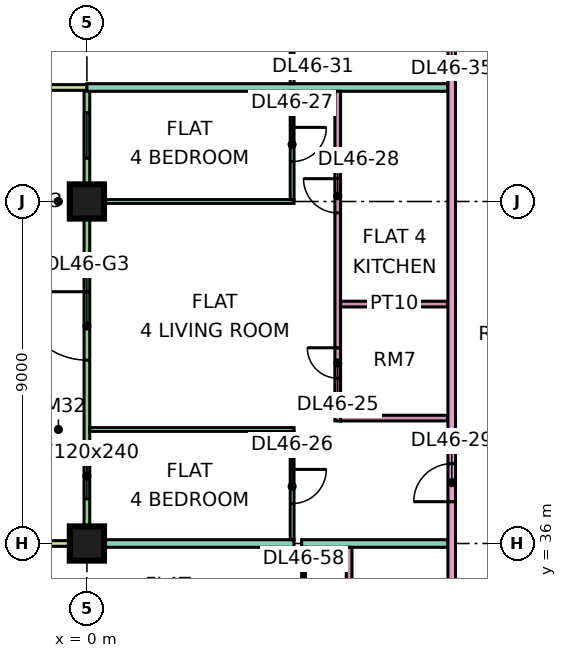
"""IFC4 building model, lengths in metres.
Left out: names, types, materials, properties, quantities, classifications, styles, units other than length and angle.
Written with IfcOpenShell. Run it as: python <this file> out.ifc"""

import sys

from ifc_helpers import new_model, si_unit, direction, frame, frame_2d, origin, origin_2d, place, context, subcontext, project, spatial, rectangle, extrude, element, fill, save


model = new_model("IFC4")
c1 = context("Model", 3, precision=1e-05, world=origin(), true_north=direction((0.0, 1.0)))
c2 = subcontext(c1, "Body", "Model", "MODEL_VIEW")
j1 = project(units=[si_unit("LENGTHUNIT", "METRE"), si_unit("PLANEANGLEUNIT", "RADIAN")], contexts=[c1])
p1 = place(None, origin())
s1 = spatial("IfcSite", under=j1, at=p1, CompositionType="ELEMENT")
p2 = place(p1, origin())
s2 = spatial("IfcBuilding", under=s1, at=p2, CompositionType="ELEMENT")
p3 = place(p2, frame((0.0, 0.0, 198.65)))
s3 = spatial("IfcBuildingStorey", under=s2, at=p3, CompositionType="ELEMENT", Elevation=198.65)
p4 = place(p3, frame((0.0, 36.0, 0.0), z_axis=(0.0, 0.0, 1.0), x_axis=(1.0, 0.0, 0.0)))
e1 = element("IfcColumn", 1, at=p4, inside=s3, PredefinedType="COLUMN", context=c2, shape_type="SweptSolid", body=[
    extrude(rectangle(XDim=0.9, YDim=0.9, at=origin_2d()), origin(), (0.0, 0.0, 1.0), 3.75),
])
p5 = place(p3, frame((0.0, 45.0, 0.0), z_axis=(0.0, 0.0, 1.0), x_axis=(1.0, 0.0, 0.0)))
e2 = element("IfcColumn", 2, at=p5, inside=s3, PredefinedType="COLUMN", context=c2, shape_type="SweptSolid", body=[
    extrude(rectangle(XDim=0.9, YDim=0.9, at=origin_2d()), origin(), (0.0, 0.0, 1.0), 3.75),
])
p6 = place(p3, frame((0.0, 47.925, 0.0), z_axis=(0.0, 0.0, 1.0), x_axis=(0.0, -1.0, 0.0)))
e3 = element("IfcWall", 3, at=p6, inside=s3, PredefinedType="SOLIDWALL", context=c2, shape_type="SweptSolid", body=[
    extrude(rectangle(XDim=11.85, YDim=0.15, at=frame_2d((5.925, 0.0))), origin(), (0.0, 0.0, 1.0), 3.35),
])
p7 = place(p6, frame((0.587, 0.0, 0.45)))
e4 = element("IfcOpeningElement", 4, at=p7, cuts=e3, PredefinedType="OPENING", context=c2, shape_type="SweptSolid", body=[
    extrude(rectangle(XDim=1.2, YDim=2.4, at=frame_2d((0.6, 1.2))), frame((0.0, 0.085, 0.0), z_axis=(0.0, -1.0, 0.0), x_axis=(1.0, 0.0, 0.0)), (0.0, 0.0, 1.0), 0.17),
])
p8 = place(p6, frame((5.3, 0.0, 0.0)))
e5 = element("IfcOpeningElement", 5, at=p8, cuts=e3, PredefinedType="OPENING", context=c2, shape_type="SweptSolid", body=[
    extrude(rectangle(XDim=1.8, YDim=2.4, at=frame_2d((0.9, 1.2))), frame((0.0, 0.085, 0.0), z_axis=(0.0, -1.0, 0.0), x_axis=(1.0, 0.0, 0.0)), (0.0, 0.0, 1.0), 0.17),
])
p9 = place(p6, frame((9.55, 0.0, 0.45)))
e6 = element("IfcOpeningElement", 6, at=p9, cuts=e3, PredefinedType="OPENING", context=c2, shape_type="SweptSolid", body=[
    extrude(rectangle(XDim=1.2, YDim=2.4, at=frame_2d((0.6, 1.2))), frame((0.0, 0.085, 0.0), z_axis=(0.0, -1.0, 0.0), x_axis=(1.0, 0.0, 0.0)), (0.0, 0.0, 1.0), 0.17),
])
for number, where, z_axis, x_axis in (
    (7, (-1.5, 48.0, 0.0), (0.0, 0.0, 1.0), (1.0, 0.0, 0.0)),
    (8, (-1.5, 36.0, 0.0), (0.0, 0.0, 1.0), (1.0, 0.0, 0.0)),
):
    element("IfcWall", number, at=place(p3, frame(where, z_axis=z_axis, x_axis=x_axis)), inside=s3, PredefinedType="SOLIDWALL", context=c2, shape_type="SweptSolid", body=[
        extrude(rectangle(XDim=1.5, YDim=0.15, at=frame_2d((0.75, 0.0))), origin(), (0.0, 0.0, 1.0), 3.35),
    ])
e9 = element("IfcWall", 9, at=p4, inside=s3, PredefinedType="PARTITIONING", context=c2, shape_type="SweptSolid", body=[
    extrude(rectangle(XDim=5.45, YDim=0.2, at=frame_2d((2.725, 0.0))), origin(), (0.0, 0.0, 1.0), 3.35),
])
p10 = place(p3, frame((0.0, 48.0, 0.0), z_axis=(0.0, 0.0, 1.0), x_axis=(1.0, 0.0, 0.0)))
e10 = element("IfcWall", 10, at=p10, inside=s3, PredefinedType="PARTITIONING", context=c2, shape_type="SweptSolid", body=[
    extrude(rectangle(XDim=9.5, YDim=0.2, at=frame_2d((4.75, 0.0))), origin(), (0.0, 0.0, 1.0), 3.35),
])
for number, where, z_axis, x_axis in (
    (11, (0.074, 39.0, 0.0), (0.0, 0.0, 1.0), (1.0, 0.0, 0.0)),
    (12, (0.074, 45.0, 0.0), (0.0, 0.0, 1.0), (1.0, 0.0, 0.0)),
):
    element("IfcWall", number, at=place(p3, frame(where, z_axis=z_axis, x_axis=x_axis)), inside=s3, PredefinedType="PARTITIONING", context=c2, shape_type="SweptSolid", body=[
        extrude(rectangle(XDim=5.376, YDim=0.1, at=frame_2d((2.688, 0.0))), origin(), (0.0, 0.0, 1.0), 3.35),
    ])
p11 = place(p3, frame((5.4, 36.1, 0.0), z_axis=(0.0, 0.0, 1.0), x_axis=(0.0, 1.0, 0.0)))
e13 = element("IfcWall", 13, at=p11, inside=s3, PredefinedType="PARTITIONING", context=c2, shape_type="SweptSolid", body=[
    extrude(rectangle(XDim=2.85, YDim=0.1, at=frame_2d((1.425, 0.0))), origin(), (0.0, 0.0, 1.0), 3.35),
])
p12 = place(p11, frame((0.95, 0.0, 0.0)))
e14 = element("IfcOpeningElement", 14, at=p12, cuts=e13, PredefinedType="OPENING", context=c2, shape_type="SweptSolid", body=[
    extrude(rectangle(XDim=0.9, YDim=2.1, at=frame_2d((0.45, 1.05))), frame((0.0, 0.06, 0.0), z_axis=(0.0, -1.0, 0.0), x_axis=(1.0, 0.0, 0.0)), (0.0, 0.0, 1.0), 0.12),
])
p13 = place(p3, frame((5.4, 45.05, 0.0), z_axis=(0.0, 0.0, 1.0), x_axis=(0.0, 1.0, 0.0)))
e15 = element("IfcWall", 15, at=p13, inside=s3, PredefinedType="PARTITIONING", context=c2, shape_type="SweptSolid", body=[
    extrude(rectangle(XDim=2.85, YDim=0.1, at=frame_2d((1.425, 0.0))), origin(), (0.0, 0.0, 1.0), 3.35),
])
p14 = place(p13, frame((1.0, 0.0, 0.0)))
e16 = element("IfcOpeningElement", 16, at=p14, cuts=e15, PredefinedType="OPENING", context=c2, shape_type="SweptSolid", body=[
    extrude(rectangle(XDim=0.9, YDim=2.1, at=frame_2d((0.45, 1.05))), frame((0.0, 0.06, 0.0), z_axis=(0.0, -1.0, 0.0), x_axis=(1.0, 0.0, 0.0)), (0.0, 0.0, 1.0), 0.12),
])
p15 = place(p3, frame((5.4, 48.1, 0.0), z_axis=(0.0, 0.0, 1.0), x_axis=(0.0, 1.0, 0.0)))
e17 = element("IfcWall", 17, at=p15, inside=s3, PredefinedType="PARTITIONING", context=c2, shape_type="SweptSolid", body=[
    extrude(rectangle(XDim=2.85, YDim=0.1, at=frame_2d((1.425, 0.0))), origin(), (0.0, 0.0, 1.0), 3.35),
])
p16 = place(p15, frame((0.95, 0.0, 0.0)))
e18 = element("IfcOpeningElement", 18, at=p16, cuts=e17, PredefinedType="OPENING", context=c2, shape_type="SweptSolid", body=[
    extrude(rectangle(XDim=0.9, YDim=2.1, at=frame_2d((0.45, 1.05))), frame((0.0, 0.06, 0.0), z_axis=(0.0, -1.0, 0.0), x_axis=(1.0, 0.0, 0.0)), (0.0, 0.0, 1.0), 0.12),
])
p17 = place(p3, frame((5.65, 36.0, 0.0), z_axis=(0.0, 0.0, 1.0), x_axis=(1.0, 0.0, 0.0)))
e19 = element("IfcWall", 19, at=p17, inside=s3, PredefinedType="PARTITIONING", context=c2, shape_type="SweptSolid", body=[
    extrude(rectangle(XDim=3.85, YDim=0.2, at=frame_2d((1.925, 0.0))), origin(), (0.0, 0.0, 1.0), 3.35),
])
p18 = place(p3, frame((5.7, 33.05, 0.0), z_axis=(0.0, 0.0, 1.0), x_axis=(0.0, 1.0, 0.0)))
e20 = element("IfcWall", 20, at=p18, inside=s3, PredefinedType="PARTITIONING", context=c2, shape_type="SweptSolid", body=[
    extrude(rectangle(XDim=2.85, YDim=0.1, at=frame_2d((1.425, 0.0))), origin(), (0.0, 0.0, 1.0), 3.35),
])
p19 = place(p18, frame((1.0, 0.0, 0.0)))
e21 = element("IfcOpeningElement", 21, at=p19, cuts=e20, PredefinedType="OPENING", context=c2, shape_type="SweptSolid", body=[
    extrude(rectangle(XDim=0.9, YDim=2.1, at=frame_2d((0.45, 1.05))), frame((0.0, 0.06, 0.0), z_axis=(0.0, -1.0, 0.0), x_axis=(1.0, 0.0, 0.0)), (0.0, 0.0, 1.0), 0.12),
])
p20 = place(p3, frame((6.6, 39.225, 0.0), z_axis=(0.0, 0.0, 1.0), x_axis=(0.0, 1.0, 0.0)))
e22 = element("IfcWall", 22, at=p20, inside=s3, PredefinedType="PARTITIONING", context=c2, shape_type="SweptSolid", body=[
    extrude(rectangle(XDim=8.675, YDim=0.15, at=frame_2d((4.337, 0.0))), origin(), (0.0, 0.0, 1.0), 3.35),
])
p21 = place(p20, frame((1.125, 0.0, 0.0)))
e23 = element("IfcOpeningElement", 23, at=p21, cuts=e22, PredefinedType="OPENING", context=c2, shape_type="SweptSolid", body=[
    extrude(rectangle(XDim=0.8, YDim=2.1, at=frame_2d((0.4, 1.05))), frame((0.0, 0.085, 0.0), z_axis=(0.0, -1.0, 0.0), x_axis=(1.0, 0.0, 0.0)), (0.0, 0.0, 1.0), 0.17),
])
p22 = place(p20, frame((5.475, 0.0, 0.0)))
e24 = element("IfcOpeningElement", 24, at=p22, cuts=e22, PredefinedType="OPENING", context=c2, shape_type="SweptSolid", body=[
    extrude(rectangle(XDim=0.9, YDim=2.1, at=frame_2d((0.45, 1.05))), frame((0.0, 0.085, 0.0), z_axis=(0.0, -1.0, 0.0), x_axis=(1.0, 0.0, 0.0)), (0.0, 0.0, 1.0), 0.17),
])
for number, where, z_axis, x_axis in (
    (25, (6.675, 39.3, 0.0), (0.0, 0.0, 1.0), (1.0, 0.0, 0.0)),
    (26, (6.675, 42.3, 0.0), (0.0, 0.0, 1.0), (1.0, 0.0, 0.0)),
):
    element("IfcWall", number, at=place(p3, frame(where, z_axis=z_axis, x_axis=x_axis)), inside=s3, PredefinedType="PARTITIONING", context=c2, shape_type="SweptSolid", body=[
        extrude(rectangle(XDim=2.825, YDim=0.15, at=frame_2d((1.413, 0.0))), origin(), (0.0, 0.0, 1.0), 3.35),
    ])
p23 = place(p3, frame((6.9, 27.225, 0.0), z_axis=(0.0, 0.0, 1.0), x_axis=(0.0, 1.0, 0.0)))
e27 = element("IfcWall", 27, at=p23, inside=s3, PredefinedType="PARTITIONING", context=c2, shape_type="SweptSolid", body=[
    extrude(rectangle(XDim=8.675, YDim=0.15, at=frame_2d((4.337, 0.0))), origin(), (0.0, 0.0, 1.0), 3.35),
])
p24 = place(p23, frame((1.125, 0.0, 0.0)))
e28 = element("IfcOpeningElement", 28, at=p24, cuts=e27, PredefinedType="OPENING", context=c2, shape_type="SweptSolid", body=[
    extrude(rectangle(XDim=0.8, YDim=2.1, at=frame_2d((0.4, 1.05))), frame((0.0, 0.085, 0.0), z_axis=(0.0, -1.0, 0.0), x_axis=(1.0, 0.0, 0.0)), (0.0, 0.0, 1.0), 0.17),
])
p25 = place(p23, frame((5.475, 0.0, 0.0)))
e29 = element("IfcOpeningElement", 29, at=p25, cuts=e27, PredefinedType="OPENING", context=c2, shape_type="SweptSolid", body=[
    extrude(rectangle(XDim=0.9, YDim=2.1, at=frame_2d((0.45, 1.05))), frame((0.0, 0.085, 0.0), z_axis=(0.0, -1.0, 0.0), x_axis=(1.0, 0.0, 0.0)), (0.0, 0.0, 1.0), 0.17),
])
p26 = place(p3, frame((9.6, 20.0, 0.0), z_axis=(0.0, 0.0, 1.0), x_axis=(0.0, 1.0, 0.0)))
e30 = element("IfcWall", 30, at=p26, inside=s3, PredefinedType="PARTITIONING", context=c2, shape_type="SweptSolid", body=[
    extrude(rectangle(XDim=44.35, YDim=0.2, at=frame_2d((22.175, 0.0))), origin(), (0.0, 0.0, 1.0), 3.35),
])
p27 = place(p26, frame((17.1, 0.0, 0.0)))
e31 = element("IfcOpeningElement", 31, at=p27, cuts=e30, PredefinedType="OPENING", context=c2, shape_type="SweptSolid", body=[
    extrude(rectangle(XDim=1.0, YDim=2.1, at=frame_2d((0.5, 1.05))), frame((0.0, 0.11, 0.0), z_axis=(0.0, -1.0, 0.0), x_axis=(1.0, 0.0, 0.0)), (0.0, 0.0, 1.0), 0.22),
])
p28 = place(p26, frame((29.1, 0.0, 0.0)))
e32 = element("IfcOpeningElement", 32, at=p28, cuts=e30, PredefinedType="OPENING", context=c2, shape_type="SweptSolid", body=[
    extrude(rectangle(XDim=1.0, YDim=2.1, at=frame_2d((0.5, 1.05))), frame((0.0, 0.11, 0.0), z_axis=(0.0, -1.0, 0.0), x_axis=(1.0, 0.0, 0.0)), (0.0, 0.0, 1.0), 0.22),
])
p29 = place(p26, frame((0.6, 0.0, 0.0)))
e33 = element("IfcOpeningElement", 33, at=p29, cuts=e30, PredefinedType="OPENING", context=c2, shape_type="SweptSolid", body=[
    extrude(rectangle(XDim=1.2, YDim=2.1, at=frame_2d((0.6, 1.05))), frame((0.0, 0.11, 0.0), z_axis=(0.0, -1.0, 0.0), x_axis=(1.0, 0.0, 0.0)), (0.0, 0.0, 1.0), 0.22),
])
p30 = place(p26, frame((4.35, 0.0, 0.0)))
e34 = element("IfcOpeningElement", 34, at=p30, cuts=e30, PredefinedType="OPENING", context=c2, shape_type="SweptSolid", body=[
    extrude(rectangle(XDim=1.0, YDim=2.1, at=frame_2d((0.5, 1.05))), frame((0.0, 0.11, 0.0), z_axis=(0.0, -1.0, 0.0), x_axis=(1.0, 0.0, 0.0)), (0.0, 0.0, 1.0), 0.22),
])
p31 = place(p7, origin())
e35 = element("IfcWindow", 35, at=p31, inside=s3, PartitioningType="SINGLE_PANEL", PredefinedType="WINDOW", context=c2, shape_type="SweptSolid", body=[
    extrude(rectangle(XDim=1.2, YDim=2.4, at=frame_2d((0.6, 1.2))), frame((0.0, 0.03, 0.0), z_axis=(0.0, -1.0, 0.0), x_axis=(1.0, 0.0, 0.0)), (0.0, 0.0, 1.0), 0.06),
])
fill(e4, e35)
p32 = place(p8, frame((1.8, 0.0, 0.0), z_axis=(0.0, 0.0, 1.0), x_axis=(-1.0, 0.0, 0.0)))
e36 = element("IfcDoor", 36, at=p32, inside=s3, OperationType="DOUBLE_DOOR_SINGLE_SWING", PredefinedType="DOOR", context=c2, shape_type="SweptSolid", body=[
    extrude(rectangle(XDim=1.8, YDim=2.4, at=frame_2d((0.9, 1.2))), frame((0.0, 0.025, 0.0), z_axis=(0.0, -1.0, 0.0), x_axis=(1.0, 0.0, 0.0)), (0.0, 0.0, 1.0), 0.05),
])
fill(e5, e36)
p33 = place(p9, origin())
e37 = element("IfcWindow", 37, at=p33, inside=s3, PartitioningType="SINGLE_PANEL", PredefinedType="WINDOW", context=c2, shape_type="SweptSolid", body=[
    extrude(rectangle(XDim=1.2, YDim=2.4, at=frame_2d((0.6, 1.2))), frame((0.0, 0.03, 0.0), z_axis=(0.0, -1.0, 0.0), x_axis=(1.0, 0.0, 0.0)), (0.0, 0.0, 1.0), 0.06),
])
fill(e6, e37)
p34 = place(p21, frame((0.8, 0.0, 0.0), z_axis=(0.0, 0.0, 1.0), x_axis=(-1.0, 0.0, 0.0)))
e38 = element("IfcDoor", 38, at=p34, inside=s3, OperationType="SINGLE_SWING_RIGHT", PredefinedType="DOOR", context=c2, shape_type="SweptSolid", body=[
    extrude(rectangle(XDim=0.8, YDim=2.1, at=frame_2d((0.4, 1.05))), frame((0.0, 0.025, 0.0), z_axis=(0.0, -1.0, 0.0), x_axis=(1.0, 0.0, 0.0)), (0.0, 0.0, 1.0), 0.05),
])
fill(e23, e38)
p35 = place(p12, origin())
e39 = element("IfcDoor", 39, at=p35, inside=s3, OperationType="SINGLE_SWING_RIGHT", PredefinedType="DOOR", context=c2, shape_type="SweptSolid", body=[
    extrude(rectangle(XDim=0.9, YDim=2.1, at=frame_2d((0.45, 1.05))), frame((0.0, 0.025, 0.0), z_axis=(0.0, -1.0, 0.0), x_axis=(1.0, 0.0, 0.0)), (0.0, 0.0, 1.0), 0.05),
])
fill(e14, e39)
p36 = place(p14, origin())
e40 = element("IfcDoor", 40, at=p36, inside=s3, OperationType="SINGLE_SWING_RIGHT", PredefinedType="DOOR", context=c2, shape_type="SweptSolid", body=[
    extrude(rectangle(XDim=0.9, YDim=2.1, at=frame_2d((0.45, 1.05))), frame((0.0, 0.025, 0.0), z_axis=(0.0, -1.0, 0.0), x_axis=(1.0, 0.0, 0.0)), (0.0, 0.0, 1.0), 0.05),
])
fill(e16, e40)
p37 = place(p22, frame((0.9, 0.0, 0.0), z_axis=(0.0, 0.0, 1.0), x_axis=(-1.0, 0.0, 0.0)))
e41 = element("IfcDoor", 41, at=p37, inside=s3, OperationType="SINGLE_SWING_RIGHT", PredefinedType="DOOR", context=c2, shape_type="SweptSolid", body=[
    extrude(rectangle(XDim=0.9, YDim=2.1, at=frame_2d((0.45, 1.05))), frame((0.0, 0.025, 0.0), z_axis=(0.0, -1.0, 0.0), x_axis=(1.0, 0.0, 0.0)), (0.0, 0.0, 1.0), 0.05),
])
fill(e24, e41)
p38 = place(p27, origin())
e42 = element("IfcDoor", 42, at=p38, inside=s3, OperationType="SINGLE_SWING_LEFT", PredefinedType="DOOR", context=c2, shape_type="SweptSolid", body=[
    extrude(rectangle(XDim=1.0, YDim=2.1, at=frame_2d((0.5, 1.05))), frame((0.0, 0.025, 0.0), z_axis=(0.0, -1.0, 0.0), x_axis=(1.0, 0.0, 0.0)), (0.0, 0.0, 1.0), 0.05),
])
fill(e31, e42)
save(model, sys.argv[1])
